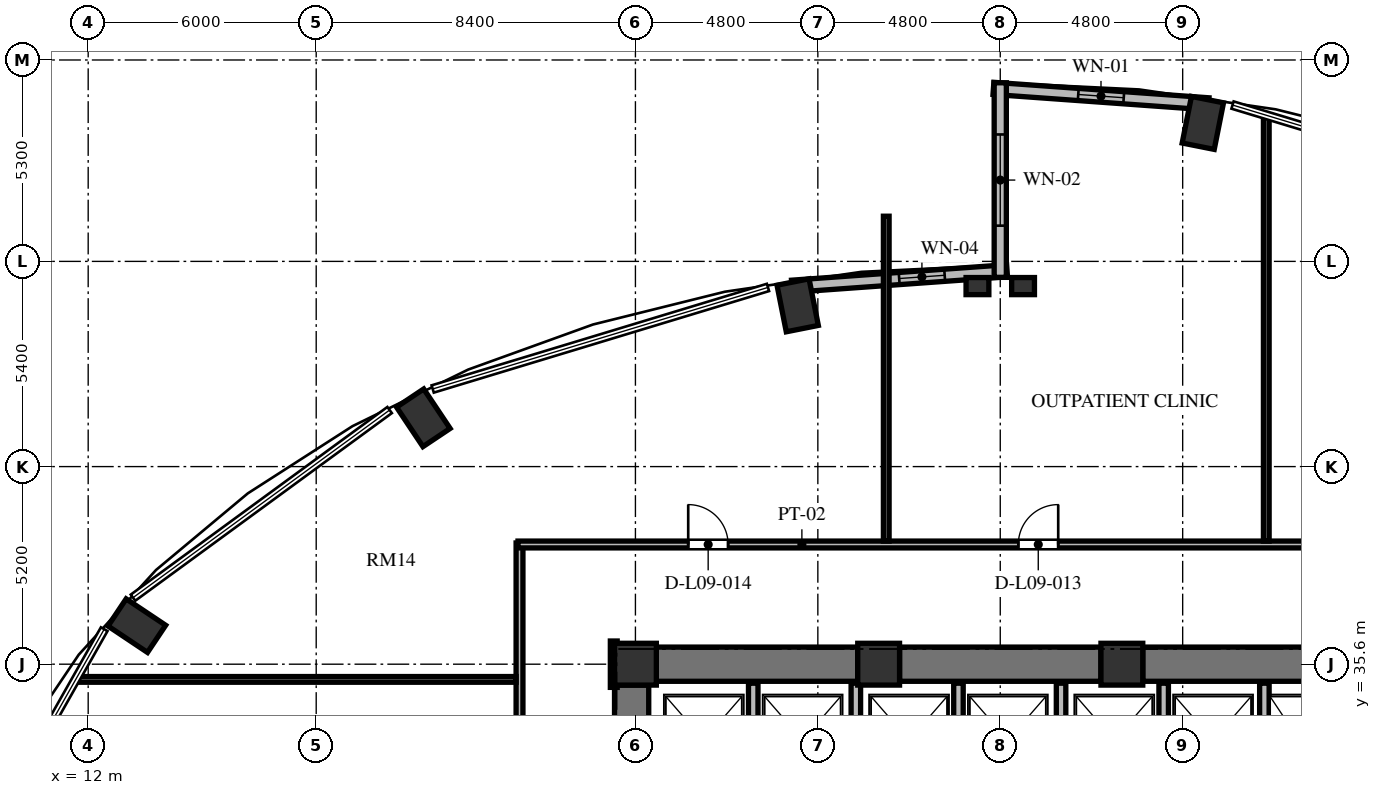
"""IFC4 building model, lengths in metres.
Left out: names, types, materials, properties, quantities, classifications, styles, units other than length and angle.
Written with IfcOpenShell. Run it as: python <this file> out.ifc"""

import sys

from ifc_helpers import new_model, si_unit, direction, frame, frame_2d, origin, origin_2d, place, context, subcontext, project, spatial, rectangle, extrude, element, fill, save


model = new_model("IFC4")
c1 = context("Model", 3, precision=1e-05, world=origin(), true_north=direction((0.0, 1.0)))
c2 = subcontext(c1, "Body", "Model", "MODEL_VIEW")
j1 = project(units=[si_unit("LENGTHUNIT", "METRE"), si_unit("PLANEANGLEUNIT", "RADIAN")], contexts=[c1])
p1 = place(None, origin())
s1 = spatial("IfcSite", under=j1, at=p1, CompositionType="ELEMENT")
p2 = place(p1, origin())
s2 = spatial("IfcBuilding", under=s1, at=p2, CompositionType="ELEMENT")
p3 = place(p2, frame((0.0, 0.0, 39.792)))
s3 = spatial("IfcBuildingStorey", under=s2, at=p3, CompositionType="ELEMENT", Elevation=39.792)
for number, where, z_axis, x_axis in (
    (1, (41.331, 49.844, 0.0), (0.0, 0.0, 1.0), (0.195, 0.981, 0.0)),
    (2, (30.669, 45.044, 0.0), (0.0, 0.0, 1.0), (-0.195, 0.981, 0.0)),
    (3, (20.819, 42.084, 0.0), (0.0, 0.0, 1.0), (-0.556, 0.831, 0.0)),
    (4, (13.28, 36.614, 0.0), (0.0, 0.0, 1.0), (-0.831, 0.556, 0.0)),
):
    element("IfcColumn", number, at=place(p3, frame(where, z_axis=z_axis, x_axis=x_axis)), inside=s3, PredefinedType="COLUMN", context=c2, shape_type="SweptSolid", body=[
        extrude(rectangle(XDim=1.25, YDim=0.86, at=origin_2d()), origin(), (0.0, 0.0, 1.0), 3.648),
    ])
for number, where, z_axis, x_axis in (
    (5, (39.2, 35.6, 0.0), (0.0, 0.0, 1.0), (1.0, 0.0, 0.0)),
    (6, (32.8, 35.6, 0.0), (0.0, 0.0, 1.0), (1.0, 0.0, 0.0)),
    (7, (26.4, 35.6, 0.0), (0.0, 0.0, 1.0), (1.0, 0.0, 0.0)),
):
    element("IfcColumn", number, at=place(p3, frame(where, z_axis=z_axis, x_axis=x_axis)), inside=s3, PredefinedType="COLUMN", context=c2, shape_type="SweptSolid", body=[
        extrude(rectangle(XDim=1.1, YDim=1.1, at=origin_2d()), origin(), (0.0, 0.0, 1.0), 3.648),
    ])
for number, where, z_axis, x_axis in (
    (8, (35.4, 45.55, 0.0), (0.0, 0.0, 1.0), (1.0, 0.0, 0.0)),
    (9, (36.6, 45.55, 0.0), (0.0, 0.0, 1.0), (1.0, 0.0, 0.0)),
):
    element("IfcColumn", number, at=place(p3, frame(where, z_axis=z_axis, x_axis=x_axis)), inside=s3, PredefinedType="PILASTER", context=c2, shape_type="SweptSolid", body=[
        extrude(rectangle(XDim=0.6, YDim=0.45, at=origin_2d()), origin(), (0.0, 0.0, 1.0), 3.648),
    ])
p4 = place(p3, frame((26.3, 20.95, 0.0), z_axis=(0.0, 0.0, 1.0), x_axis=(0.0, 1.0, 0.0)))
e10 = element("IfcWall", 10, at=p4, inside=s3, PredefinedType="SHEAR", context=c2, shape_type="SweptSolid", body=[
    extrude(rectangle(XDim=14.1, YDim=0.9, at=frame_2d((7.05, 0.0))), origin(), (0.0, 0.0, 1.0), 3.648),
])
p5 = place(p4, frame((6.5, 0.0, 0.0)))
e11 = element("IfcOpeningElement", 11, at=p5, cuts=e10, PredefinedType="OPENING", context=c2, shape_type="SweptSolid", body=[
    extrude(rectangle(XDim=1.2, YDim=2.15, at=frame_2d((0.6, 1.075))), frame((0.0, 0.46, 0.0), z_axis=(0.0, -1.0, 0.0), x_axis=(1.0, 0.0, 0.0)), (0.0, 0.0, 1.0), 0.92),
])
p6 = place(p4, frame((9.6, 0.0, 0.0)))
e12 = element("IfcOpeningElement", 12, at=p6, cuts=e10, PredefinedType="OPENING", context=c2, shape_type="SweptSolid", body=[
    extrude(rectangle(XDim=1.3, YDim=2.2, at=frame_2d((0.65, 1.1))), frame((0.0, 0.46, 0.0), z_axis=(0.0, -1.0, 0.0), x_axis=(1.0, 0.0, 0.0)), (0.0, 0.0, 1.0), 0.92),
])
p7 = place(p4, frame((3.26, 0.0, 0.0)))
e13 = element("IfcOpeningElement", 13, at=p7, cuts=e10, PredefinedType="OPENING", context=c2, shape_type="SweptSolid", body=[
    extrude(rectangle(XDim=1.3, YDim=2.2, at=frame_2d((0.65, 1.1))), frame((0.0, 0.46, 0.0), z_axis=(0.0, -1.0, 0.0), x_axis=(1.0, 0.0, 0.0)), (0.0, 0.0, 1.0), 0.92),
])
p8 = place(p3, frame((26.95, 35.6, 0.0), z_axis=(0.0, 0.0, 1.0), x_axis=(1.0, 0.0, 0.0)))
e14 = element("IfcWall", 14, at=p8, inside=s3, PredefinedType="SHEAR", context=c2, shape_type="SweptSolid", body=[
    extrude(rectangle(XDim=5.3, YDim=0.9, at=frame_2d((2.65, 0.0))), origin(), (0.0, 0.0, 1.0), 3.648),
])
p9 = place(p3, frame((33.35, 35.6, 0.0), z_axis=(0.0, 0.0, 1.0), x_axis=(1.0, 0.0, 0.0)))
e15 = element("IfcWall", 15, at=p9, inside=s3, PredefinedType="SHEAR", context=c2, shape_type="SweptSolid", body=[
    extrude(rectangle(XDim=5.3, YDim=0.9, at=frame_2d((2.65, 0.0))), origin(), (0.0, 0.0, 1.0), 3.648),
])
p10 = place(p3, frame((39.75, 35.6, 0.0), z_axis=(0.0, 0.0, 1.0), x_axis=(1.0, 0.0, 0.0)))
e16 = element("IfcWall", 16, at=p10, inside=s3, PredefinedType="SHEAR", context=c2, shape_type="SweptSolid", body=[
    extrude(rectangle(XDim=5.3, YDim=0.9, at=frame_2d((2.65, 0.0))), origin(), (0.0, 0.0, 1.0), 3.648),
])
p11 = place(p3, frame((41.481, 50.346, 0.0), z_axis=(0.0, 0.0, 1.0), x_axis=(-0.997422321809, 0.071754525696, 0.0)))
e17 = element("IfcWall", 17, at=p11, inside=s3, PredefinedType="SOLIDWALL", context=c2, shape_type="SweptSolid", body=[
    extrude(rectangle(XDim=5.675, YDim=0.32, at=frame_2d((2.838, 0.0))), origin(), (0.0, 0.0, 1.0), 3.428),
])
p12 = place(p11, frame((2.238, 0.0, 0.85)))
e18 = element("IfcOpeningElement", 18, at=p12, cuts=e17, PredefinedType="OPENING", context=c2, shape_type="SweptSolid", body=[
    extrude(rectangle(XDim=1.2, YDim=2.2, at=frame_2d((0.6, 1.1))), frame((0.0, 0.17, 0.0), z_axis=(0.0, -1.0, 0.0), x_axis=(1.0, 0.0, 0.0)), (0.0, 0.0, 1.0), 0.34),
])
p13 = place(p3, frame((36.179, 45.953, 0.0), z_axis=(0.0, 0.0, 1.0), x_axis=(-0.997421878774, -0.071760683825, 0.0)))
e19 = element("IfcWall", 19, at=p13, inside=s3, PredefinedType="SOLIDWALL", context=c2, shape_type="SweptSolid", body=[
    extrude(rectangle(XDim=5.675, YDim=0.32, at=frame_2d((2.837, 0.0))), origin(), (0.0, 0.0, 1.0), 3.428),
])
p14 = place(p13, frame((1.646, 0.0, 0.85)))
e20 = element("IfcOpeningElement", 20, at=p14, cuts=e19, PredefinedType="OPENING", context=c2, shape_type="SweptSolid", body=[
    extrude(rectangle(XDim=1.2, YDim=1.8, at=frame_2d((0.6, 0.9))), frame((0.0, 0.17, 0.0), z_axis=(0.0, -1.0, 0.0), x_axis=(1.0, 0.0, 0.0)), (0.0, 0.0, 1.0), 0.34),
])
p15 = place(p3, frame((36.0, 50.9, 0.0), z_axis=(0.0, 0.0, 1.0), x_axis=(0.0, -1.0, 0.0)))
e21 = element("IfcWall", 21, at=p15, inside=s3, PredefinedType="SOLIDWALL", context=c2, shape_type="SweptSolid", body=[
    extrude(rectangle(XDim=5.12, YDim=0.32, at=frame_2d((2.56, 0.0))), origin(), (0.0, 0.0, 1.0), 3.428),
])
p16 = place(p15, frame((1.36, 0.0, 0.84)))
e22 = element("IfcOpeningElement", 22, at=p16, cuts=e21, PredefinedType="OPENING", context=c2, shape_type="SweptSolid", body=[
    extrude(rectangle(XDim=2.4, YDim=2.04, at=frame_2d((1.2, 1.02))), frame((0.0, 0.17, 0.0), z_axis=(0.0, -1.0, 0.0), x_axis=(1.0, 0.0, 0.0)), (0.0, 0.0, 1.0), 0.34),
])
p17 = place(p3, frame((42.95, 31.92, 0.0), z_axis=(0.0, 0.0, 1.0), x_axis=(0.0, 1.0, 0.0)))
e23 = element("IfcWall", 23, at=p17, inside=s3, PredefinedType="SOLIDWALL", context=c2, shape_type="SweptSolid", body=[
    extrude(rectangle(XDim=3.18, YDim=0.25, at=frame_2d((1.59, 0.0))), origin(), (0.0, 0.0, 1.0), 3.428),
])
for number, where, z_axis, x_axis in (
    (24, (29.5, 32.42, 0.0), (0.0, 0.0, 1.0), (0.0, 1.0, 0.0)),
    (25, (32.2, 32.42, 0.0), (0.0, 0.0, 1.0), (0.0, 1.0, 0.0)),
    (26, (34.9, 32.42, 0.0), (0.0, 0.0, 1.0), (0.0, 1.0, 0.0)),
    (27, (37.6, 32.42, 0.0), (0.0, 0.0, 1.0), (0.0, 1.0, 0.0)),
    (28, (40.3, 32.42, 0.0), (0.0, 0.0, 1.0), (0.0, 1.0, 0.0)),
):
    element("IfcWall", number, at=place(p3, frame(where, z_axis=z_axis, x_axis=x_axis)), inside=s3, PredefinedType="SOLIDWALL", context=c2, shape_type="SweptSolid", body=[
        extrude(rectangle(XDim=2.68, YDim=0.25, at=frame_2d((1.34, 0.0))), origin(), (0.0, 0.0, 1.0), 3.428),
    ])
p18 = place(p3, frame((23.35, 29.36, 0.0), z_axis=(0.0, 0.0, 1.0), x_axis=(0.0, 1.0, 0.0)))
e29 = element("IfcWall", 29, at=p18, inside=s3, PredefinedType="PARTITIONING", context=c2, shape_type="SweptSolid", body=[
    extrude(rectangle(XDim=9.43, YDim=0.18, at=frame_2d((4.715, 0.0))), origin(), (0.0, 0.0, 1.0), 3.428),
])
p19 = place(p18, frame((3.815, 0.0, 0.0)))
e30 = element("IfcOpeningElement", 30, at=p19, cuts=e29, PredefinedType="OPENING", context=c2, shape_type="SweptSolid", body=[
    extrude(rectangle(XDim=1.05, YDim=2.15, at=frame_2d((0.525, 1.075))), frame((0.0, 0.1, 0.0), z_axis=(0.0, -1.0, 0.0), x_axis=(1.0, 0.0, 0.0)), (0.0, 0.0, 1.0), 0.2),
])
p20 = place(p3, frame((23.31, 38.75, 0.0), z_axis=(0.0, 0.0, 1.0), x_axis=(1.0, 0.0, 0.0)))
e31 = element("IfcWall", 31, at=p20, inside=s3, PredefinedType="PARTITIONING", context=c2, shape_type="SweptSolid", body=[
    extrude(rectangle(XDim=29.88, YDim=0.18, at=frame_2d((14.94, 0.0))), origin(), (0.0, 0.0, 1.0), 3.053),
])
p21 = place(p20, frame((24.101, 0.0, 0.0)))
e32 = element("IfcOpeningElement", 32, at=p21, cuts=e31, PredefinedType="OPENING", context=c2, shape_type="SweptSolid", body=[
    extrude(rectangle(XDim=1.05, YDim=2.15, at=frame_2d((0.525, 1.075))), frame((0.0, 0.1, 0.0), z_axis=(0.0, -1.0, 0.0), x_axis=(1.0, 0.0, 0.0)), (0.0, 0.0, 1.0), 0.2),
])
p22 = place(p20, frame((13.165, 0.0, 0.0)))
e33 = element("IfcOpeningElement", 33, at=p22, cuts=e31, PredefinedType="OPENING", context=c2, shape_type="SweptSolid", body=[
    extrude(rectangle(XDim=1.05, YDim=2.15, at=frame_2d((0.525, 1.075))), frame((0.0, 0.1, 0.0), z_axis=(0.0, -1.0, 0.0), x_axis=(1.0, 0.0, 0.0)), (0.0, 0.0, 1.0), 0.2),
])
p23 = place(p20, frame((4.479, 0.0, 0.0)))
e34 = element("IfcOpeningElement", 34, at=p23, cuts=e31, PredefinedType="OPENING", context=c2, shape_type="SweptSolid", body=[
    extrude(rectangle(XDim=1.05, YDim=2.15, at=frame_2d((0.525, 1.075))), frame((0.0, 0.1, 0.0), z_axis=(0.0, -1.0, 0.0), x_axis=(1.0, 0.0, 0.0)), (0.0, 0.0, 1.0), 0.2),
])
p24 = place(p3, frame((25.83, 36.21, 0.0), z_axis=(0.0, 0.0, 1.0), x_axis=(0.0, -1.0, 0.0)))
e35 = element("IfcWall", 35, at=p24, inside=s3, PredefinedType="PARTITIONING", context=c2, shape_type="SweptSolid", body=[
    extrude(rectangle(XDim=1.22, YDim=0.18, at=frame_2d((0.61, 0.0))), origin(), (0.0, 0.0, 1.0), 3.428),
])
p25 = place(p3, frame((11.677, 35.2, 0.0), z_axis=(0.0, 0.0, 1.0), x_axis=(1.0, 0.0, 0.0)))
e36 = element("IfcWall", 36, at=p25, inside=s3, PredefinedType="PARTITIONING", context=c2, shape_type="SweptSolid", body=[
    extrude(rectangle(XDim=11.583, YDim=0.15, at=frame_2d((5.791, 0.0))), origin(), (0.0, 0.0, 1.0), 3.428),
])
p26 = place(p3, frame((33.0, 38.84, 0.0), z_axis=(0.0, 0.0, 1.0), x_axis=(0.0, 1.0, 0.0)))
e37 = element("IfcWall", 37, at=p26, inside=s3, PredefinedType="PARTITIONING", context=c2, shape_type="SweptSolid", body=[
    extrude(rectangle(XDim=8.549, YDim=0.15, at=frame_2d((4.274, 0.0))), origin(), (0.0, 0.0, 1.0), 3.428),
])
p27 = place(p3, frame((43.0, 38.84, 0.0), z_axis=(0.0, 0.0, 1.0), x_axis=(0.0, 1.0, 0.0)))
e38 = element("IfcWall", 38, at=p27, inside=s3, PredefinedType="PARTITIONING", context=c2, shape_type="SweptSolid", body=[
    extrude(rectangle(XDim=11.193, YDim=0.15, at=frame_2d((5.597, 0.0))), origin(), (0.0, 0.0, 1.0), 3.428),
])
p28 = place(p12, origin())
e39 = element("IfcWindow", 39, at=p28, inside=s3, PartitioningType="SINGLE_PANEL", PredefinedType="WINDOW", context=c2, shape_type="SweptSolid", body=[
    extrude(rectangle(XDim=1.2, YDim=2.2, at=frame_2d((0.6, 1.1))), frame((0.0, 0.03, 0.0), z_axis=(0.0, -1.0, 0.0), x_axis=(1.0, 0.0, 0.0)), (0.0, 0.0, 1.0), 0.06),
])
fill(e18, e39)
p29 = place(p14, origin())
e40 = element("IfcWindow", 40, at=p29, inside=s3, PartitioningType="SINGLE_PANEL", PredefinedType="WINDOW", context=c2, shape_type="SweptSolid", body=[
    extrude(rectangle(XDim=1.2, YDim=1.8, at=frame_2d((0.6, 0.9))), frame((0.0, 0.03, 0.0), z_axis=(0.0, -1.0, 0.0), x_axis=(1.0, 0.0, 0.0)), (0.0, 0.0, 1.0), 0.06),
])
fill(e20, e40)
p30 = place(p16, origin())
e41 = element("IfcWindow", 41, at=p30, inside=s3, PartitioningType="SINGLE_PANEL", PredefinedType="WINDOW", context=c2, shape_type="SweptSolid", body=[
    extrude(rectangle(XDim=2.4, YDim=2.04, at=frame_2d((1.2, 1.02))), frame((0.0, 0.03, 0.0), z_axis=(0.0, -1.0, 0.0), x_axis=(1.0, 0.0, 0.0)), (0.0, 0.0, 1.0), 0.06),
])
fill(e22, e41)
p31 = place(p22, origin())
e42 = element("IfcDoor", 42, at=p31, inside=s3, OperationType="SINGLE_SWING_RIGHT", PredefinedType="DOOR", context=c2, shape_type="SweptSolid", body=[
    extrude(rectangle(XDim=1.05, YDim=2.15, at=frame_2d((0.525, 1.075))), frame((0.0, 0.025, 0.0), z_axis=(0.0, -1.0, 0.0), x_axis=(1.0, 0.0, 0.0)), (0.0, 0.0, 1.0), 0.05),
])
fill(e33, e42)
p32 = place(p23, origin())
e43 = element("IfcDoor", 43, at=p32, inside=s3, OperationType="SINGLE_SWING_LEFT", PredefinedType="DOOR", context=c2, shape_type="SweptSolid", body=[
    extrude(rectangle(XDim=1.05, YDim=2.15, at=frame_2d((0.525, 1.075))), frame((0.0, 0.025, 0.0), z_axis=(0.0, -1.0, 0.0), x_axis=(1.0, 0.0, 0.0)), (0.0, 0.0, 1.0), 0.05),
])
fill(e34, e43)
save(model, sys.argv[1])
